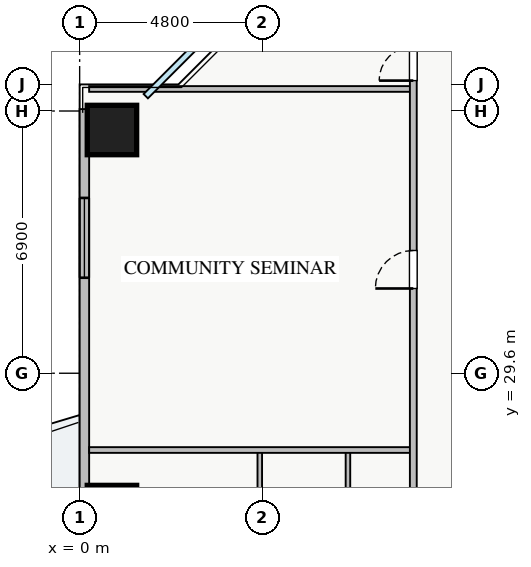
"""IFC4 building model, lengths in metres.
Left out: names, types, materials, properties, quantities, classifications, styles, units other than length and angle.
Written with IfcOpenShell. Run it as: python <this file> out.ifc"""

import sys

from ifc_helpers import new_model, si_unit, direction, frame, frame_2d, origin, origin_2d, place, context, subcontext, project, spatial, rectangle, extrude, source, transform, mapped, element, fill, save


model = new_model("IFC4")
c1 = context("Model", 3, precision=1e-05, world=origin(), true_north=direction((0.0, 1.0)))
c2 = subcontext(c1, "Body", "Model", "MODEL_VIEW")
j1 = project(units=[si_unit("LENGTHUNIT", "METRE"), si_unit("PLANEANGLEUNIT", "RADIAN")], contexts=[c1])
p1 = place(None, origin())
s1 = spatial("IfcSite", under=j1, at=p1, CompositionType="ELEMENT")
p2 = place(p1, origin())
s2 = spatial("IfcBuilding", under=s1, at=p2, CompositionType="ELEMENT")
p3 = place(p2, frame((0.0, 0.0, 73.0)))
s3 = spatial("IfcBuildingStorey", under=s2, at=p3, CompositionType="ELEMENT", Elevation=73.0)
m1 = source(origin(), c2, "Body", "SweptSolid", [
    extrude(rectangle(XDim=1.3, YDim=1.3, at=origin_2d()), origin(), (0.0, 0.0, 1.0), 3.25),
])
for number, where, z_axis, x_axis in (
    (1, (0.85, 36.0, 0.0), (0.0, 0.0, 1.0), (1.0, 0.0, 0.0)),
    (2, (0.85, 26.0, 0.0), (0.0, 0.0, 1.0), (1.0, 0.0, 0.0)),
):
    element("IfcColumn", number, at=place(p3, frame(where, z_axis=z_axis, x_axis=x_axis)), inside=s3, PredefinedType="COLUMN", context=c2, shape_type="MappedRepresentation", body=[
        mapped(m1, transform((0.0, 0.0, 0.0), x_axis=(1.0, 0.0, 0.0), y_axis=(0.0, 1.0, 0.0), z_axis=(0.0, 0.0, 1.0), scale=1.0)),
    ])
p4 = place(p3, frame((0.125, 9.45, 0.0), z_axis=(0.0, 0.0, 1.0), x_axis=(0.0, 1.0, 0.0)))
e3 = element("IfcWall", 3, at=p4, inside=s3, PredefinedType="STANDARD", context=c2, shape_type="SweptSolid", body=[
    extrude(rectangle(XDim=27.1, YDim=0.25, at=frame_2d((13.55, 0.0))), origin(), (0.0, 0.0, 1.0), 2.61),
])
p5 = place(p4, frame((14.4, 0.0, 0.0)))
e4 = element("IfcOpeningElement", 4, at=p5, cuts=e3, PredefinedType="OPENING", context=c2, shape_type="SweptSolid", body=[
    extrude(rectangle(XDim=1.2, YDim=2.1, at=frame_2d((0.6, 1.05))), frame((0.0, 0.135, 0.0), z_axis=(0.0, -1.0, 0.0), x_axis=(1.0, 0.0, 0.0)), (0.0, 0.0, 1.0), 0.27),
])
p6 = place(p4, frame((1.403, 0.0, 0.9)))
e5 = element("IfcOpeningElement", 5, at=p6, cuts=e3, PredefinedType="OPENING", context=c2, shape_type="SweptSolid", body=[
    extrude(rectangle(XDim=1.8, YDim=1.5, at=frame_2d((0.9, 0.75))), frame((0.0, 0.135, 0.0), z_axis=(0.0, -1.0, 0.0), x_axis=(1.0, 0.0, 0.0)), (0.0, 0.0, 1.0), 0.27),
])
p7 = place(p4, frame((22.663, 0.0, 0.9)))
e6 = element("IfcOpeningElement", 6, at=p7, cuts=e3, PredefinedType="OPENING", context=c2, shape_type="SweptSolid", body=[
    extrude(rectangle(XDim=2.1, YDim=1.48, at=frame_2d((1.05, 0.74))), frame((0.0, 0.135, 0.0), z_axis=(0.0, -1.0, 0.0), x_axis=(1.0, 0.0, 0.0)), (0.0, 0.0, 1.0), 0.27),
])
p8 = place(p4, frame((4.607, 0.0, 0.9)))
e7 = element("IfcOpeningElement", 7, at=p8, cuts=e3, PredefinedType="OPENING", context=c2, shape_type="SweptSolid", body=[
    extrude(rectangle(XDim=2.4, YDim=1.5, at=frame_2d((1.2, 0.75))), frame((0.0, 0.135, 0.0), z_axis=(0.0, -1.0, 0.0), x_axis=(1.0, 0.0, 0.0)), (0.0, 0.0, 1.0), 0.27),
])
p9 = place(p4, frame((13.17, 0.0, 0.9)))
e8 = element("IfcOpeningElement", 8, at=p9, cuts=e3, PredefinedType="OPENING", context=c2, shape_type="SweptSolid", body=[
    extrude(rectangle(XDim=0.9, YDim=1.2, at=frame_2d((0.45, 0.6))), frame((0.0, 0.135, 0.0), z_axis=(0.0, -1.0, 0.0), x_axis=(1.0, 0.0, 0.0)), (0.0, 0.0, 1.0), 0.27),
])
p10 = place(p4, frame((8.405, 0.0, 0.9)))
e9 = element("IfcOpeningElement", 9, at=p10, cuts=e3, PredefinedType="OPENING", context=c2, shape_type="SweptSolid", body=[
    extrude(rectangle(XDim=0.9, YDim=1.2, at=frame_2d((0.45, 0.6))), frame((0.0, 0.135, 0.0), z_axis=(0.0, -1.0, 0.0), x_axis=(1.0, 0.0, 0.0)), (0.0, 0.0, 1.0), 0.27),
])
p11 = place(p3, frame((0.25, 37.08, 0.0), z_axis=(0.0, 0.0, 1.0), x_axis=(1.0, 0.0, 0.0)))
e10 = element("IfcWall", 10, at=p11, inside=s3, PredefinedType="PARTITIONING", context=c2, shape_type="SweptSolid", body=[
    extrude(rectangle(XDim=8.53, YDim=0.15, at=frame_2d((4.265, 0.0))), origin(), (0.0, 0.0, 1.0), 3.07),
])
for number, where, z_axis, x_axis in (
    (11, (4.74, 22.4, 0.0), (0.0, 0.0, 1.0), (0.0, 1.0, 0.0)),
    (12, (7.06, 22.4, 0.0), (0.0, 0.0, 1.0), (0.0, 1.0, 0.0)),
):
    element("IfcWall", number, at=place(p3, frame(where, z_axis=z_axis, x_axis=x_axis)), inside=s3, PredefinedType="PLUMBINGWALL", context=c2, shape_type="SweptSolid", body=[
        extrude(rectangle(XDim=5.18, YDim=0.12, at=frame_2d((2.59, 0.0))), origin(), (0.0, 0.0, 1.0), 3.07),
    ])
p12 = place(p3, frame((0.25, 27.58, 0.0), z_axis=(0.0, 0.0, 1.0), x_axis=(1.0, 0.0, 0.0)))
e13 = element("IfcWall", 13, at=p12, inside=s3, PredefinedType="PARTITIONING", context=c2, shape_type="SweptSolid", body=[
    extrude(rectangle(XDim=8.53, YDim=0.15, at=frame_2d((4.265, 0.0))), origin(), (0.0, 0.0, 1.0), 3.07),
])
p13 = place(p3, frame((8.78, 7.21, 0.0), z_axis=(0.0, 0.0, 1.0), x_axis=(0.0, 1.0, 0.0)))
e14 = element("IfcWall", 14, at=p13, inside=s3, PredefinedType="PARTITIONING", context=c2, shape_type="SweptSolid", body=[
    extrude(rectangle(XDim=31.23, YDim=0.18, at=frame_2d((15.615, 0.0))), origin(), (0.0, 0.0, 1.0), 3.07),
])
p14 = place(p13, frame((30.09, 0.0, 0.0)))
e15 = element("IfcOpeningElement", 15, at=p14, cuts=e14, PredefinedType="OPENING", context=c2, shape_type="SweptSolid", body=[
    extrude(rectangle(XDim=0.9, YDim=2.05, at=frame_2d((0.45, 1.025))), frame((0.0, 0.1, 0.0), z_axis=(0.0, -1.0, 0.0), x_axis=(1.0, 0.0, 0.0)), (0.0, 0.0, 1.0), 0.2),
])
p15 = place(p13, frame((0.24, 0.0, 0.0)))
e16 = element("IfcOpeningElement", 16, at=p15, cuts=e14, PredefinedType="OPENING", context=c2, shape_type="SweptSolid", body=[
    extrude(rectangle(XDim=0.9, YDim=2.05, at=frame_2d((0.45, 1.025))), frame((0.0, 0.1, 0.0), z_axis=(0.0, -1.0, 0.0), x_axis=(1.0, 0.0, 0.0)), (0.0, 0.0, 1.0), 0.2),
])
p16 = place(p13, frame((2.84, 0.0, 0.0)))
e17 = element("IfcOpeningElement", 17, at=p16, cuts=e14, PredefinedType="OPENING", context=c2, shape_type="SweptSolid", body=[
    extrude(rectangle(XDim=1.0, YDim=2.05, at=frame_2d((0.5, 1.025))), frame((0.0, 0.1, 0.0), z_axis=(0.0, -1.0, 0.0), x_axis=(1.0, 0.0, 0.0)), (0.0, 0.0, 1.0), 0.2),
])
p17 = place(p13, frame((12.11, 0.0, 0.0)))
e18 = element("IfcOpeningElement", 18, at=p17, cuts=e14, PredefinedType="OPENING", context=c2, shape_type="SweptSolid", body=[
    extrude(rectangle(XDim=1.0, YDim=2.05, at=frame_2d((0.5, 1.025))), frame((0.0, 0.1, 0.0), z_axis=(0.0, -1.0, 0.0), x_axis=(1.0, 0.0, 0.0)), (0.0, 0.0, 1.0), 0.2),
])
p18 = place(p13, frame((24.62, 0.0, 0.0)))
e19 = element("IfcOpeningElement", 19, at=p18, cuts=e14, PredefinedType="OPENING", context=c2, shape_type="SweptSolid", body=[
    extrude(rectangle(XDim=1.0, YDim=2.05, at=frame_2d((0.5, 1.025))), frame((0.0, 0.1, 0.0), z_axis=(0.0, -1.0, 0.0), x_axis=(1.0, 0.0, 0.0)), (0.0, 0.0, 1.0), 0.2),
])
m2 = source(origin(), c2, "Body", "SweptSolid", [
    extrude(rectangle(XDim=2.1, YDim=1.48, at=frame_2d((1.05, 0.74))), frame((0.0, 0.03, 0.0), z_axis=(0.0, -1.0, 0.0), x_axis=(1.0, 0.0, 0.0)), (0.0, 0.0, 1.0), 0.06),
])
p19 = place(p7, origin())
e20 = element("IfcWindow", 20, at=p19, inside=s3, PartitioningType="TRIPLE_PANEL_VERTICAL", PredefinedType="WINDOW", context=c2, shape_type="MappedRepresentation", body=[
    mapped(m2, transform((0.0, 0.0, 0.0), x_axis=(1.0, 0.0, 0.0), y_axis=(0.0, 1.0, 0.0), z_axis=(0.0, 0.0, 1.0), scale=1.0)),
])
fill(e6, e20)
m3 = source(origin(), c2, "Body", "SweptSolid", [
    extrude(rectangle(XDim=0.9, YDim=2.05, at=frame_2d((0.45, 1.025))), frame((0.0, 0.025, 0.0), z_axis=(0.0, -1.0, 0.0), x_axis=(1.0, 0.0, 0.0)), (0.0, 0.0, 1.0), 0.05),
])
p20 = place(p14, origin())
e21 = element("IfcDoor", 21, at=p20, inside=s3, OperationType="SINGLE_SWING_LEFT", PredefinedType="DOOR", context=c2, shape_type="MappedRepresentation", body=[
    mapped(m3, transform((0.0, 0.0, 0.0), x_axis=(1.0, 0.0, 0.0), y_axis=(0.0, 1.0, 0.0), z_axis=(0.0, 0.0, 1.0), scale=1.0)),
])
fill(e15, e21)
m4 = source(origin(), c2, "Body", "SweptSolid", [
    extrude(rectangle(XDim=1.0, YDim=2.05, at=frame_2d((0.5, 1.025))), frame((0.0, 0.025, 0.0), z_axis=(0.0, -1.0, 0.0), x_axis=(1.0, 0.0, 0.0)), (0.0, 0.0, 1.0), 0.05),
])
p21 = place(p18, origin())
e22 = element("IfcDoor", 22, at=p21, inside=s3, OperationType="SINGLE_SWING_LEFT", PredefinedType="DOOR", context=c2, shape_type="MappedRepresentation", body=[
    mapped(m4, transform((0.0, 0.0, 0.0), x_axis=(1.0, 0.0, 0.0), y_axis=(0.0, 1.0, 0.0), z_axis=(0.0, 0.0, 1.0), scale=1.0)),
])
fill(e19, e22)
save(model, sys.argv[1])
